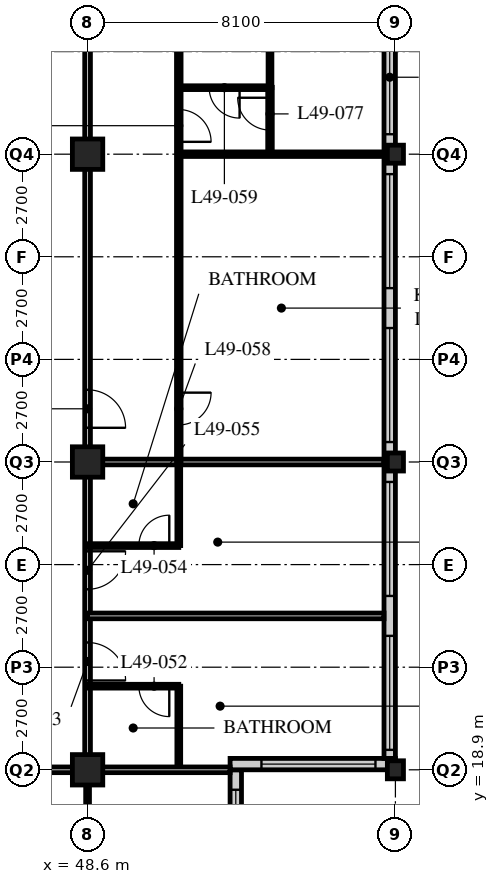
"""IFC4 building model, lengths in metres.
Left out: names, types, materials, properties, quantities, classifications, styles, units other than length and angle.
Written with IfcOpenShell. Run it as: python <this file> out.ifc"""

import sys

from ifc_helpers import new_model, si_unit, direction, frame, frame_2d, origin, origin_2d, place, context, subcontext, project, spatial, rectangle, hollow_rectangle, i_section, extrude, element, fill, save


model = new_model("IFC4")
c1 = context("Model", 3, precision=1e-05, world=origin(), true_north=direction((0.0, 1.0)))
c2 = subcontext(c1, "Body", "Model", "MODEL_VIEW")
j1 = project(units=[si_unit("LENGTHUNIT", "METRE"), si_unit("PLANEANGLEUNIT", "RADIAN")], contexts=[c1])
p1 = place(None, origin())
s1 = spatial("IfcSite", under=j1, at=p1, CompositionType="ELEMENT")
p2 = place(p1, origin())
s2 = spatial("IfcBuilding", under=s1, at=p2, CompositionType="ELEMENT")
p3 = place(p2, frame((0.0, 0.0, 192.0)))
s3 = spatial("IfcBuildingStorey", under=s2, at=p3, CompositionType="ELEMENT", Elevation=192.0)
for number, where, z_axis, x_axis in (
    (1, (48.6, 18.9, 0.0), (0.0, 0.0, 1.0), (1.0, 0.0, 0.0)),
    (2, (48.6, 27.0, 0.0), (0.0, 0.0, 1.0), (1.0, 0.0, 0.0)),
    (3, (48.6, 35.1, 0.0), (0.0, 0.0, 1.0), (1.0, 0.0, 0.0)),
):
    element("IfcColumn", number, at=place(p3, frame(where, z_axis=z_axis, x_axis=x_axis)), inside=s3, PredefinedType="COLUMN", context=c2, shape_type="SweptSolid", body=[
        extrude(hollow_rectangle(XDim=0.8, YDim=0.8, WallThickness=0.08, at=origin_2d()), origin(), (0.0, 0.0, 1.0), 3.6),
    ])
for number, where, z_axis, x_axis in (
    (4, (56.7, 18.9, 0.0), (0.0, 0.0, 1.0), (1.0, 0.0, 0.0)),
    (5, (56.7, 27.0, 0.0), (0.0, 0.0, 1.0), (1.0, 0.0, 0.0)),
    (6, (56.7, 35.1, 0.0), (0.0, 0.0, 1.0), (1.0, 0.0, 0.0)),
):
    element("IfcColumn", number, at=place(p3, frame(where, z_axis=z_axis, x_axis=x_axis)), inside=s3, PredefinedType="COLUMN", context=c2, shape_type="SweptSolid", body=[
        extrude(i_section(OverallWidth=0.424, OverallDepth=0.475, WebThickness=0.048, FlangeThickness=0.077, FilletRadius=0.015, at=origin_2d()), origin(), (0.0, 0.0, 1.0), 3.6),
    ])
p4 = place(p3, frame((52.5, 15.15, 0.0), z_axis=(0.0, 0.0, 1.0), x_axis=(0.0, 1.0, 0.0)))
e7 = element("IfcWall", 7, at=p4, inside=s3, PredefinedType="SOLIDWALL", context=c2, shape_type="SweptSolid", body=[
    extrude(rectangle(XDim=3.75, YDim=0.3, at=frame_2d((1.875, 0.0))), origin(), (0.0, 0.0, 1.0), 3.39),
])
p5 = place(p4, frame((0.225, 0.0, 0.6)))
e8 = element("IfcOpeningElement", 8, at=p5, cuts=e7, PredefinedType="OPENING", context=c2, shape_type="SweptSolid", body=[
    extrude(rectangle(XDim=3.0, YDim=2.0, at=frame_2d((1.5, 1.0))), frame((0.0, 0.16, 0.0), z_axis=(0.0, -1.0, 0.0), x_axis=(1.0, 0.0, 0.0)), (0.0, 0.0, 1.0), 0.32),
])
p6 = place(p3, frame((52.35, 19.05, 0.0), z_axis=(0.0, 0.0, 1.0), x_axis=(1.0, 0.0, 0.0)))
e9 = element("IfcWall", 9, at=p6, inside=s3, PredefinedType="SOLIDWALL", context=c2, shape_type="SweptSolid", body=[
    extrude(rectangle(XDim=4.35, YDim=0.3, at=frame_2d((2.175, 0.0))), origin(), (0.0, 0.0, 1.0), 3.39),
])
p7 = place(p6, frame((0.825, 0.0, 0.6)))
e10 = element("IfcOpeningElement", 10, at=p7, cuts=e9, PredefinedType="OPENING", context=c2, shape_type="SweptSolid", body=[
    extrude(rectangle(XDim=3.0, YDim=2.0, at=frame_2d((1.5, 1.0))), frame((0.0, 0.16, 0.0), z_axis=(0.0, -1.0, 0.0), x_axis=(1.0, 0.0, 0.0)), (0.0, 0.0, 1.0), 0.32),
])
p8 = place(p3, frame((56.55, 19.2, 0.0), z_axis=(0.0, 0.0, 1.0), x_axis=(0.0, 1.0, 0.0)))
e11 = element("IfcWall", 11, at=p8, inside=s3, PredefinedType="SOLIDWALL", context=c2, shape_type="SweptSolid", body=[
    extrude(rectangle(XDim=32.1, YDim=0.3, at=frame_2d((16.05, 0.0))), origin(), (0.0, 0.0, 1.0), 3.39),
])
p9 = place(p8, frame((0.225, 0.0, 0.6)))
e12 = element("IfcOpeningElement", 12, at=p9, cuts=e11, PredefinedType="OPENING", context=c2, shape_type="SweptSolid", body=[
    extrude(rectangle(XDim=3.0, YDim=2.4, at=frame_2d((1.5, 1.2))), frame((0.0, 0.16, 0.0), z_axis=(0.0, -1.0, 0.0), x_axis=(1.0, 0.0, 0.0)), (0.0, 0.0, 1.0), 0.32),
])
p10 = place(p8, frame((4.275, 0.0, 0.6)))
e13 = element("IfcOpeningElement", 13, at=p10, cuts=e11, PredefinedType="OPENING", context=c2, shape_type="SweptSolid", body=[
    extrude(rectangle(XDim=3.0, YDim=2.4, at=frame_2d((1.5, 1.2))), frame((0.0, 0.16, 0.0), z_axis=(0.0, -1.0, 0.0), x_axis=(1.0, 0.0, 0.0)), (0.0, 0.0, 1.0), 0.32),
])
p11 = place(p8, frame((8.325, 0.0, 0.6)))
e14 = element("IfcOpeningElement", 14, at=p11, cuts=e11, PredefinedType="OPENING", context=c2, shape_type="SweptSolid", body=[
    extrude(rectangle(XDim=3.0, YDim=2.4, at=frame_2d((1.5, 1.2))), frame((0.0, 0.16, 0.0), z_axis=(0.0, -1.0, 0.0), x_axis=(1.0, 0.0, 0.0)), (0.0, 0.0, 1.0), 0.32),
])
p12 = place(p8, frame((12.375, 0.0, 0.6)))
e15 = element("IfcOpeningElement", 15, at=p12, cuts=e11, PredefinedType="OPENING", context=c2, shape_type="SweptSolid", body=[
    extrude(rectangle(XDim=3.0, YDim=2.4, at=frame_2d((1.5, 1.2))), frame((0.0, 0.16, 0.0), z_axis=(0.0, -1.0, 0.0), x_axis=(1.0, 0.0, 0.0)), (0.0, 0.0, 1.0), 0.32),
])
p13 = place(p8, frame((16.425, 0.0, 0.6)))
e16 = element("IfcOpeningElement", 16, at=p13, cuts=e11, PredefinedType="OPENING", context=c2, shape_type="SweptSolid", body=[
    extrude(rectangle(XDim=3.0, YDim=2.4, at=frame_2d((1.5, 1.2))), frame((0.0, 0.16, 0.0), z_axis=(0.0, -1.0, 0.0), x_axis=(1.0, 0.0, 0.0)), (0.0, 0.0, 1.0), 0.32),
])
p14 = place(p8, frame((20.475, 0.0, 0.6)))
e17 = element("IfcOpeningElement", 17, at=p14, cuts=e11, PredefinedType="OPENING", context=c2, shape_type="SweptSolid", body=[
    extrude(rectangle(XDim=3.0, YDim=2.4, at=frame_2d((1.5, 1.2))), frame((0.0, 0.16, 0.0), z_axis=(0.0, -1.0, 0.0), x_axis=(1.0, 0.0, 0.0)), (0.0, 0.0, 1.0), 0.32),
])
p15 = place(p8, frame((24.525, 0.0, 0.6)))
e18 = element("IfcOpeningElement", 18, at=p15, cuts=e11, PredefinedType="OPENING", context=c2, shape_type="SweptSolid", body=[
    extrude(rectangle(XDim=3.0, YDim=2.4, at=frame_2d((1.5, 1.2))), frame((0.0, 0.16, 0.0), z_axis=(0.0, -1.0, 0.0), x_axis=(1.0, 0.0, 0.0)), (0.0, 0.0, 1.0), 0.32),
])
p16 = place(p8, frame((28.575, 0.0, 0.6)))
e19 = element("IfcOpeningElement", 19, at=p16, cuts=e11, PredefinedType="OPENING", context=c2, shape_type="SweptSolid", body=[
    extrude(rectangle(XDim=3.0, YDim=2.4, at=frame_2d((1.5, 1.2))), frame((0.0, 0.16, 0.0), z_axis=(0.0, -1.0, 0.0), x_axis=(1.0, 0.0, 0.0)), (0.0, 0.0, 1.0), 0.32),
])
p17 = place(p3, frame((8.1, 18.9, 0.0), z_axis=(0.0, 0.0, 1.0), x_axis=(1.0, 0.0, 0.0)))
e20 = element("IfcWall", 20, at=p17, inside=s3, PredefinedType="PARTITIONING", context=c2, shape_type="SweptSolid", body=[
    extrude(rectangle(XDim=40.5, YDim=0.15, at=frame_2d((20.25, 0.0))), origin(), (0.0, 0.0, 1.0), 2.778),
])
p18 = place(p17, frame((4.45, 0.0, 0.0)))
e21 = element("IfcOpeningElement", 21, at=p18, cuts=e20, PredefinedType="OPENING", context=c2, shape_type="SweptSolid", body=[
    extrude(rectangle(XDim=1.0, YDim=2.1, at=frame_2d((0.5, 1.05))), frame((0.0, 0.085, 0.0), z_axis=(0.0, -1.0, 0.0), x_axis=(1.0, 0.0, 0.0)), (0.0, 0.0, 1.0), 0.17),
])
p19 = place(p17, frame((17.1, 0.0, 0.0)))
e22 = element("IfcOpeningElement", 22, at=p19, cuts=e20, PredefinedType="OPENING", context=c2, shape_type="SweptSolid", body=[
    extrude(rectangle(XDim=1.0, YDim=2.1, at=frame_2d((0.5, 1.05))), frame((0.0, 0.085, 0.0), z_axis=(0.0, -1.0, 0.0), x_axis=(1.0, 0.0, 0.0)), (0.0, 0.0, 1.0), 0.17),
])
p20 = place(p17, frame((28.75, 0.0, 0.0)))
e23 = element("IfcOpeningElement", 23, at=p20, cuts=e20, PredefinedType="OPENING", context=c2, shape_type="SweptSolid", body=[
    extrude(rectangle(XDim=1.0, YDim=2.1, at=frame_2d((0.5, 1.05))), frame((0.0, 0.085, 0.0), z_axis=(0.0, -1.0, 0.0), x_axis=(1.0, 0.0, 0.0)), (0.0, 0.0, 1.0), 0.17),
])
p21 = place(p17, frame((2.625, 0.0, 0.0)))
e24 = element("IfcOpeningElement", 24, at=p21, cuts=e20, PredefinedType="OPENING", context=c2, shape_type="SweptSolid", body=[
    extrude(rectangle(XDim=1.0, YDim=2.1, at=frame_2d((0.5, 1.05))), frame((0.0, 0.085, 0.0), z_axis=(0.0, -1.0, 0.0), x_axis=(1.0, 0.0, 0.0)), (0.0, 0.0, 1.0), 0.17),
])
p22 = place(p17, frame((36.875, 0.0, 0.0)))
e25 = element("IfcOpeningElement", 25, at=p22, cuts=e20, PredefinedType="OPENING", context=c2, shape_type="SweptSolid", body=[
    extrude(rectangle(XDim=1.0, YDim=2.1, at=frame_2d((0.5, 1.05))), frame((0.0, 0.085, 0.0), z_axis=(0.0, -1.0, 0.0), x_axis=(1.0, 0.0, 0.0)), (0.0, 0.0, 1.0), 0.17),
])
p23 = place(p3, frame((48.6, 18.9, 0.0), z_axis=(0.0, 0.0, 1.0), x_axis=(0.0, 1.0, 0.0)))
e26 = element("IfcWall", 26, at=p23, inside=s3, PredefinedType="PARTITIONING", context=c2, shape_type="SweptSolid", body=[
    extrude(rectangle(XDim=24.3, YDim=0.15, at=frame_2d((12.15, 0.0))), origin(), (0.0, 0.0, 1.0), 2.778),
])
p24 = place(p23, frame((2.35, 0.0, 0.0)))
e27 = element("IfcOpeningElement", 27, at=p24, cuts=e26, PredefinedType="OPENING", context=c2, shape_type="SweptSolid", body=[
    extrude(rectangle(XDim=1.0, YDim=2.1, at=frame_2d((0.5, 1.05))), frame((0.0, 0.085, 0.0), z_axis=(0.0, -1.0, 0.0), x_axis=(1.0, 0.0, 0.0)), (0.0, 0.0, 1.0), 0.17),
])
p25 = place(p23, frame((4.75, 0.0, 0.0)))
e28 = element("IfcOpeningElement", 28, at=p25, cuts=e26, PredefinedType="OPENING", context=c2, shape_type="SweptSolid", body=[
    extrude(rectangle(XDim=1.0, YDim=2.1, at=frame_2d((0.5, 1.05))), frame((0.0, 0.085, 0.0), z_axis=(0.0, -1.0, 0.0), x_axis=(1.0, 0.0, 0.0)), (0.0, 0.0, 1.0), 0.17),
])
p26 = place(p23, frame((9.0, 0.0, 0.0)))
e29 = element("IfcOpeningElement", 29, at=p26, cuts=e26, PredefinedType="OPENING", context=c2, shape_type="SweptSolid", body=[
    extrude(rectangle(XDim=1.0, YDim=2.1, at=frame_2d((0.5, 1.05))), frame((0.0, 0.085, 0.0), z_axis=(0.0, -1.0, 0.0), x_axis=(1.0, 0.0, 0.0)), (0.0, 0.0, 1.0), 0.17),
])
p27 = place(p3, frame((51.0, 18.9, 0.0), z_axis=(0.0, 0.0, 1.0), x_axis=(0.0, 1.0, 0.0)))
e30 = element("IfcWall", 30, at=p27, inside=s3, PredefinedType="PARTITIONING", context=c2, shape_type="SweptSolid", body=[
    extrude(rectangle(XDim=2.2, YDim=0.1, at=frame_2d((1.1, 0.0))), origin(), (0.0, 0.0, 1.0), 3.39),
])
p28 = place(p3, frame((48.6, 21.1, 0.0), z_axis=(0.0, 0.0, 1.0), x_axis=(1.0, 0.0, 0.0)))
e31 = element("IfcWall", 31, at=p28, inside=s3, PredefinedType="PARTITIONING", context=c2, shape_type="SweptSolid", body=[
    extrude(rectangle(XDim=2.4, YDim=0.1, at=frame_2d((1.2, 0.0))), origin(), (0.0, 0.0, 1.0), 3.39),
])
p29 = place(p28, frame((1.35, 0.0, 0.0)))
e32 = element("IfcOpeningElement", 32, at=p29, cuts=e31, PredefinedType="OPENING", context=c2, shape_type="SweptSolid", body=[
    extrude(rectangle(XDim=0.8, YDim=2.1, at=frame_2d((0.4, 1.05))), frame((0.0, 0.06, 0.0), z_axis=(0.0, -1.0, 0.0), x_axis=(1.0, 0.0, 0.0)), (0.0, 0.0, 1.0), 0.12),
])
p30 = place(p3, frame((48.6, 22.95, 0.0), z_axis=(0.0, 0.0, 1.0), x_axis=(1.0, 0.0, 0.0)))
e33 = element("IfcWall", 33, at=p30, inside=s3, PredefinedType="PARTITIONING", context=c2, shape_type="SweptSolid", body=[
    extrude(rectangle(XDim=7.8, YDim=0.15, at=frame_2d((3.9, 0.0))), origin(), (0.0, 0.0, 1.0), 3.39),
])
p31 = place(p3, frame((51.0, 24.8, 0.0), z_axis=(0.0, 0.0, 1.0), x_axis=(0.0, 1.0, 0.0)))
e34 = element("IfcWall", 34, at=p31, inside=s3, PredefinedType="PARTITIONING", context=c2, shape_type="SweptSolid", body=[
    extrude(rectangle(XDim=2.2, YDim=0.1, at=frame_2d((1.1, 0.0))), origin(), (0.0, 0.0, 1.0), 3.39),
])
p32 = place(p3, frame((48.6, 24.8, 0.0), z_axis=(0.0, 0.0, 1.0), x_axis=(1.0, 0.0, 0.0)))
e35 = element("IfcWall", 35, at=p32, inside=s3, PredefinedType="PARTITIONING", context=c2, shape_type="SweptSolid", body=[
    extrude(rectangle(XDim=2.4, YDim=0.1, at=frame_2d((1.2, 0.0))), origin(), (0.0, 0.0, 1.0), 3.39),
])
p33 = place(p32, frame((1.35, 0.0, 0.0)))
e36 = element("IfcOpeningElement", 36, at=p33, cuts=e35, PredefinedType="OPENING", context=c2, shape_type="SweptSolid", body=[
    extrude(rectangle(XDim=0.8, YDim=2.1, at=frame_2d((0.4, 1.05))), frame((0.0, 0.06, 0.0), z_axis=(0.0, -1.0, 0.0), x_axis=(1.0, 0.0, 0.0)), (0.0, 0.0, 1.0), 0.12),
])
p34 = place(p3, frame((48.6, 27.0, 0.0), z_axis=(0.0, 0.0, 1.0), x_axis=(1.0, 0.0, 0.0)))
e37 = element("IfcWall", 37, at=p34, inside=s3, PredefinedType="PARTITIONING", context=c2, shape_type="SweptSolid", body=[
    extrude(rectangle(XDim=7.8, YDim=0.15, at=frame_2d((3.9, 0.0))), origin(), (0.0, 0.0, 1.0), 2.778),
])
p35 = place(p3, frame((51.0, 27.0, 0.0), z_axis=(0.0, 0.0, 1.0), x_axis=(0.0, 1.0, 0.0)))
e38 = element("IfcWall", 38, at=p35, inside=s3, PredefinedType="PARTITIONING", context=c2, shape_type="SweptSolid", body=[
    extrude(rectangle(XDim=16.2, YDim=0.12, at=frame_2d((8.1, 0.0))), origin(), (0.0, 0.0, 1.0), 3.39),
])
p36 = place(p35, frame((0.975, 0.0, 0.0)))
e39 = element("IfcOpeningElement", 39, at=p36, cuts=e38, PredefinedType="OPENING", context=c2, shape_type="SweptSolid", body=[
    extrude(rectangle(XDim=0.85, YDim=2.1, at=frame_2d((0.425, 1.05))), frame((0.0, 0.07, 0.0), z_axis=(0.0, -1.0, 0.0), x_axis=(1.0, 0.0, 0.0)), (0.0, 0.0, 1.0), 0.14),
])
p37 = place(p35, frame((8.425, 0.0, 0.0)))
e40 = element("IfcOpeningElement", 40, at=p37, cuts=e38, PredefinedType="OPENING", context=c2, shape_type="SweptSolid", body=[
    extrude(rectangle(XDim=0.85, YDim=2.1, at=frame_2d((0.425, 1.05))), frame((0.0, 0.07, 0.0), z_axis=(0.0, -1.0, 0.0), x_axis=(1.0, 0.0, 0.0)), (0.0, 0.0, 1.0), 0.14),
])
p38 = place(p35, frame((12.475, 0.0, 0.0)))
e41 = element("IfcOpeningElement", 41, at=p38, cuts=e38, PredefinedType="OPENING", context=c2, shape_type="SweptSolid", body=[
    extrude(rectangle(XDim=0.85, YDim=2.1, at=frame_2d((0.425, 1.05))), frame((0.0, 0.07, 0.0), z_axis=(0.0, -1.0, 0.0), x_axis=(1.0, 0.0, 0.0)), (0.0, 0.0, 1.0), 0.14),
])
p39 = place(p3, frame((51.0, 36.85, 0.0), z_axis=(0.0, 0.0, 1.0), x_axis=(1.0, 0.0, 0.0)))
e42 = element("IfcWall", 42, at=p39, inside=s3, PredefinedType="PARTITIONING", context=c2, shape_type="SweptSolid", body=[
    extrude(rectangle(XDim=2.4, YDim=0.1, at=frame_2d((1.2, 0.0))), origin(), (0.0, 0.0, 1.0), 3.39),
])
p40 = place(p39, frame((0.8, 0.0, 0.0)))
e43 = element("IfcOpeningElement", 43, at=p40, cuts=e42, PredefinedType="OPENING", context=c2, shape_type="SweptSolid", body=[
    extrude(rectangle(XDim=0.8, YDim=2.1, at=frame_2d((0.4, 1.05))), frame((0.0, 0.06, 0.0), z_axis=(0.0, -1.0, 0.0), x_axis=(1.0, 0.0, 0.0)), (0.0, 0.0, 1.0), 0.12),
])
p41 = place(p3, frame((53.4, 36.85, 0.0), z_axis=(0.0, 0.0, 1.0), x_axis=(0.0, 1.0, 0.0)))
e44 = element("IfcWall", 44, at=p41, inside=s3, PredefinedType="PARTITIONING", context=c2, shape_type="SweptSolid", body=[
    extrude(rectangle(XDim=2.3, YDim=0.1, at=frame_2d((1.15, 0.0))), origin(), (0.0, 0.0, 1.0), 3.39),
])
p42 = place(p3, frame((51.0, 35.1, 0.0), z_axis=(0.0, 0.0, 1.0), x_axis=(1.0, 0.0, 0.0)))
e45 = element("IfcWall", 45, at=p42, inside=s3, PredefinedType="PARTITIONING", context=c2, shape_type="SweptSolid", body=[
    extrude(rectangle(XDim=5.4, YDim=0.12, at=frame_2d((2.7, 0.0))), origin(), (0.0, 0.0, 1.0), 2.778),
])
p43 = place(p3, frame((48.6, 18.9, 0.0), z_axis=(0.0, 0.0, 1.0), x_axis=(0.0, -1.0, 0.0)))
e46 = element("IfcWall", 46, at=p43, inside=s3, PredefinedType="PARTITIONING", context=c2, shape_type="SweptSolid", body=[
    extrude(rectangle(XDim=2.4, YDim=0.1, at=frame_2d((1.2, 0.0))), origin(), (0.0, 0.0, 1.0), 2.778),
])
p44 = place(p3, frame((48.6, 18.9, 0.0), z_axis=(0.0, 0.0, 1.0), x_axis=(1.0, 0.0, 0.0)))
e47 = element("IfcWall", 47, at=p44, inside=s3, PredefinedType="PARTITIONING", context=c2, shape_type="SweptSolid", body=[
    extrude(rectangle(XDim=3.75, YDim=0.15, at=frame_2d((1.875, 0.0))), origin(), (0.0, 0.0, 1.0), 2.778),
])
p45 = place(p3, frame((53.4, 36.86, 0.0), z_axis=(0.0, 0.0, 1.0), x_axis=(0.0, -1.0, 0.0)))
e48 = element("IfcWall", 48, at=p45, inside=s3, PredefinedType="PARTITIONING", context=c2, shape_type="SweptSolid", body=[
    extrude(rectangle(XDim=1.76, YDim=0.12, at=frame_2d((0.88, 0.0))), origin(), (0.0, 0.0, 1.0), 3.39),
])
p46 = place(p45, frame((0.275, 0.0, 0.0)))
e49 = element("IfcOpeningElement", 49, at=p46, cuts=e48, PredefinedType="OPENING", context=c2, shape_type="SweptSolid", body=[
    extrude(rectangle(XDim=0.85, YDim=2.1, at=frame_2d((0.425, 1.05))), frame((0.0, 0.07, 0.0), z_axis=(0.0, -1.0, 0.0), x_axis=(1.0, 0.0, 0.0)), (0.0, 0.0, 1.0), 0.14),
])
p47 = place(p5, origin())
e50 = element("IfcWindow", 50, at=p47, inside=s3, PartitioningType="SINGLE_PANEL", PredefinedType="WINDOW", context=c2, shape_type="SweptSolid", body=[
    extrude(rectangle(XDim=3.0, YDim=2.0, at=frame_2d((1.5, 1.0))), frame((0.0, 0.03, 0.0), z_axis=(0.0, -1.0, 0.0), x_axis=(1.0, 0.0, 0.0)), (0.0, 0.0, 1.0), 0.06),
])
fill(e8, e50)
p48 = place(p7, origin())
e51 = element("IfcWindow", 51, at=p48, inside=s3, PartitioningType="SINGLE_PANEL", PredefinedType="WINDOW", context=c2, shape_type="SweptSolid", body=[
    extrude(rectangle(XDim=3.0, YDim=2.0, at=frame_2d((1.5, 1.0))), frame((0.0, 0.03, 0.0), z_axis=(0.0, -1.0, 0.0), x_axis=(1.0, 0.0, 0.0)), (0.0, 0.0, 1.0), 0.06),
])
fill(e10, e51)
p49 = place(p9, origin())
e52 = element("IfcWindow", 52, at=p49, inside=s3, PartitioningType="SINGLE_PANEL", PredefinedType="WINDOW", context=c2, shape_type="SweptSolid", body=[
    extrude(rectangle(XDim=3.0, YDim=2.4, at=frame_2d((1.5, 1.2))), frame((0.0, 0.03, 0.0), z_axis=(0.0, -1.0, 0.0), x_axis=(1.0, 0.0, 0.0)), (0.0, 0.0, 1.0), 0.06),
])
fill(e12, e52)
p50 = place(p10, origin())
e53 = element("IfcWindow", 53, at=p50, inside=s3, PartitioningType="SINGLE_PANEL", PredefinedType="WINDOW", context=c2, shape_type="SweptSolid", body=[
    extrude(rectangle(XDim=3.0, YDim=2.4, at=frame_2d((1.5, 1.2))), frame((0.0, 0.03, 0.0), z_axis=(0.0, -1.0, 0.0), x_axis=(1.0, 0.0, 0.0)), (0.0, 0.0, 1.0), 0.06),
])
fill(e13, e53)
p51 = place(p11, origin())
e54 = element("IfcWindow", 54, at=p51, inside=s3, PartitioningType="SINGLE_PANEL", PredefinedType="WINDOW", context=c2, shape_type="SweptSolid", body=[
    extrude(rectangle(XDim=3.0, YDim=2.4, at=frame_2d((1.5, 1.2))), frame((0.0, 0.03, 0.0), z_axis=(0.0, -1.0, 0.0), x_axis=(1.0, 0.0, 0.0)), (0.0, 0.0, 1.0), 0.06),
])
fill(e14, e54)
p52 = place(p12, origin())
e55 = element("IfcWindow", 55, at=p52, inside=s3, PartitioningType="SINGLE_PANEL", PredefinedType="WINDOW", context=c2, shape_type="SweptSolid", body=[
    extrude(rectangle(XDim=3.0, YDim=2.4, at=frame_2d((1.5, 1.2))), frame((0.0, 0.03, 0.0), z_axis=(0.0, -1.0, 0.0), x_axis=(1.0, 0.0, 0.0)), (0.0, 0.0, 1.0), 0.06),
])
fill(e15, e55)
p53 = place(p13, origin())
e56 = element("IfcWindow", 56, at=p53, inside=s3, PartitioningType="SINGLE_PANEL", PredefinedType="WINDOW", context=c2, shape_type="SweptSolid", body=[
    extrude(rectangle(XDim=3.0, YDim=2.4, at=frame_2d((1.5, 1.2))), frame((0.0, 0.03, 0.0), z_axis=(0.0, -1.0, 0.0), x_axis=(1.0, 0.0, 0.0)), (0.0, 0.0, 1.0), 0.06),
])
fill(e16, e56)
p54 = place(p29, origin())
e57 = element("IfcDoor", 57, at=p54, inside=s3, OperationType="SINGLE_SWING_LEFT", PredefinedType="DOOR", context=c2, shape_type="SweptSolid", body=[
    extrude(rectangle(XDim=0.8, YDim=2.1, at=frame_2d((0.4, 1.05))), frame((0.0, 0.025, 0.0), z_axis=(0.0, -1.0, 0.0), x_axis=(1.0, 0.0, 0.0)), (0.0, 0.0, 1.0), 0.05),
])
fill(e32, e57)
p55 = place(p24, origin())
e58 = element("IfcDoor", 58, at=p55, inside=s3, OperationType="SINGLE_SWING_RIGHT", PredefinedType="DOOR", context=c2, shape_type="SweptSolid", body=[
    extrude(rectangle(XDim=1.0, YDim=2.1, at=frame_2d((0.5, 1.05))), frame((0.0, 0.025, 0.0), z_axis=(0.0, -1.0, 0.0), x_axis=(1.0, 0.0, 0.0)), (0.0, 0.0, 1.0), 0.05),
])
fill(e27, e58)
p56 = place(p33, origin())
e59 = element("IfcDoor", 59, at=p56, inside=s3, OperationType="SINGLE_SWING_RIGHT", PredefinedType="DOOR", context=c2, shape_type="SweptSolid", body=[
    extrude(rectangle(XDim=0.8, YDim=2.1, at=frame_2d((0.4, 1.05))), frame((0.0, 0.025, 0.0), z_axis=(0.0, -1.0, 0.0), x_axis=(1.0, 0.0, 0.0)), (0.0, 0.0, 1.0), 0.05),
])
fill(e36, e59)
p57 = place(p25, origin())
e60 = element("IfcDoor", 60, at=p57, inside=s3, OperationType="SINGLE_SWING_LEFT", PredefinedType="DOOR", context=c2, shape_type="SweptSolid", body=[
    extrude(rectangle(XDim=1.0, YDim=2.1, at=frame_2d((0.5, 1.05))), frame((0.0, 0.025, 0.0), z_axis=(0.0, -1.0, 0.0), x_axis=(1.0, 0.0, 0.0)), (0.0, 0.0, 1.0), 0.05),
])
fill(e28, e60)
p58 = place(p26, origin())
e61 = element("IfcDoor", 61, at=p58, inside=s3, OperationType="SINGLE_SWING_RIGHT", PredefinedType="DOOR", context=c2, shape_type="SweptSolid", body=[
    extrude(rectangle(XDim=1.0, YDim=2.1, at=frame_2d((0.5, 1.05))), frame((0.0, 0.025, 0.0), z_axis=(0.0, -1.0, 0.0), x_axis=(1.0, 0.0, 0.0)), (0.0, 0.0, 1.0), 0.05),
])
fill(e29, e61)
p59 = place(p36, origin())
e62 = element("IfcDoor", 62, at=p59, inside=s3, OperationType="SINGLE_SWING_LEFT", PredefinedType="DOOR", context=c2, shape_type="SweptSolid", body=[
    extrude(rectangle(XDim=0.85, YDim=2.1, at=frame_2d((0.425, 1.05))), frame((0.0, 0.025, 0.0), z_axis=(0.0, -1.0, 0.0), x_axis=(1.0, 0.0, 0.0)), (0.0, 0.0, 1.0), 0.05),
])
fill(e39, e62)
p60 = place(p40, origin())
e63 = element("IfcDoor", 63, at=p60, inside=s3, OperationType="SINGLE_SWING_LEFT", PredefinedType="DOOR", context=c2, shape_type="SweptSolid", body=[
    extrude(rectangle(XDim=0.8, YDim=2.1, at=frame_2d((0.4, 1.05))), frame((0.0, 0.025, 0.0), z_axis=(0.0, -1.0, 0.0), x_axis=(1.0, 0.0, 0.0)), (0.0, 0.0, 1.0), 0.05),
])
fill(e43, e63)
p61 = place(p37, origin())
e64 = element("IfcDoor", 64, at=p61, inside=s3, OperationType="SINGLE_SWING_RIGHT", PredefinedType="DOOR", context=c2, shape_type="SweptSolid", body=[
    extrude(rectangle(XDim=0.85, YDim=2.1, at=frame_2d((0.425, 1.05))), frame((0.0, 0.025, 0.0), z_axis=(0.0, -1.0, 0.0), x_axis=(1.0, 0.0, 0.0)), (0.0, 0.0, 1.0), 0.05),
])
fill(e40, e64)
p62 = place(p46, origin())
e65 = element("IfcDoor", 65, at=p62, inside=s3, OperationType="SINGLE_SWING_RIGHT", PredefinedType="DOOR", context=c2, shape_type="SweptSolid", body=[
    extrude(rectangle(XDim=0.85, YDim=2.1, at=frame_2d((0.425, 1.05))), frame((0.0, 0.025, 0.0), z_axis=(0.0, -1.0, 0.0), x_axis=(1.0, 0.0, 0.0)), (0.0, 0.0, 1.0), 0.05),
])
fill(e49, e65)
save(model, sys.argv[1])
